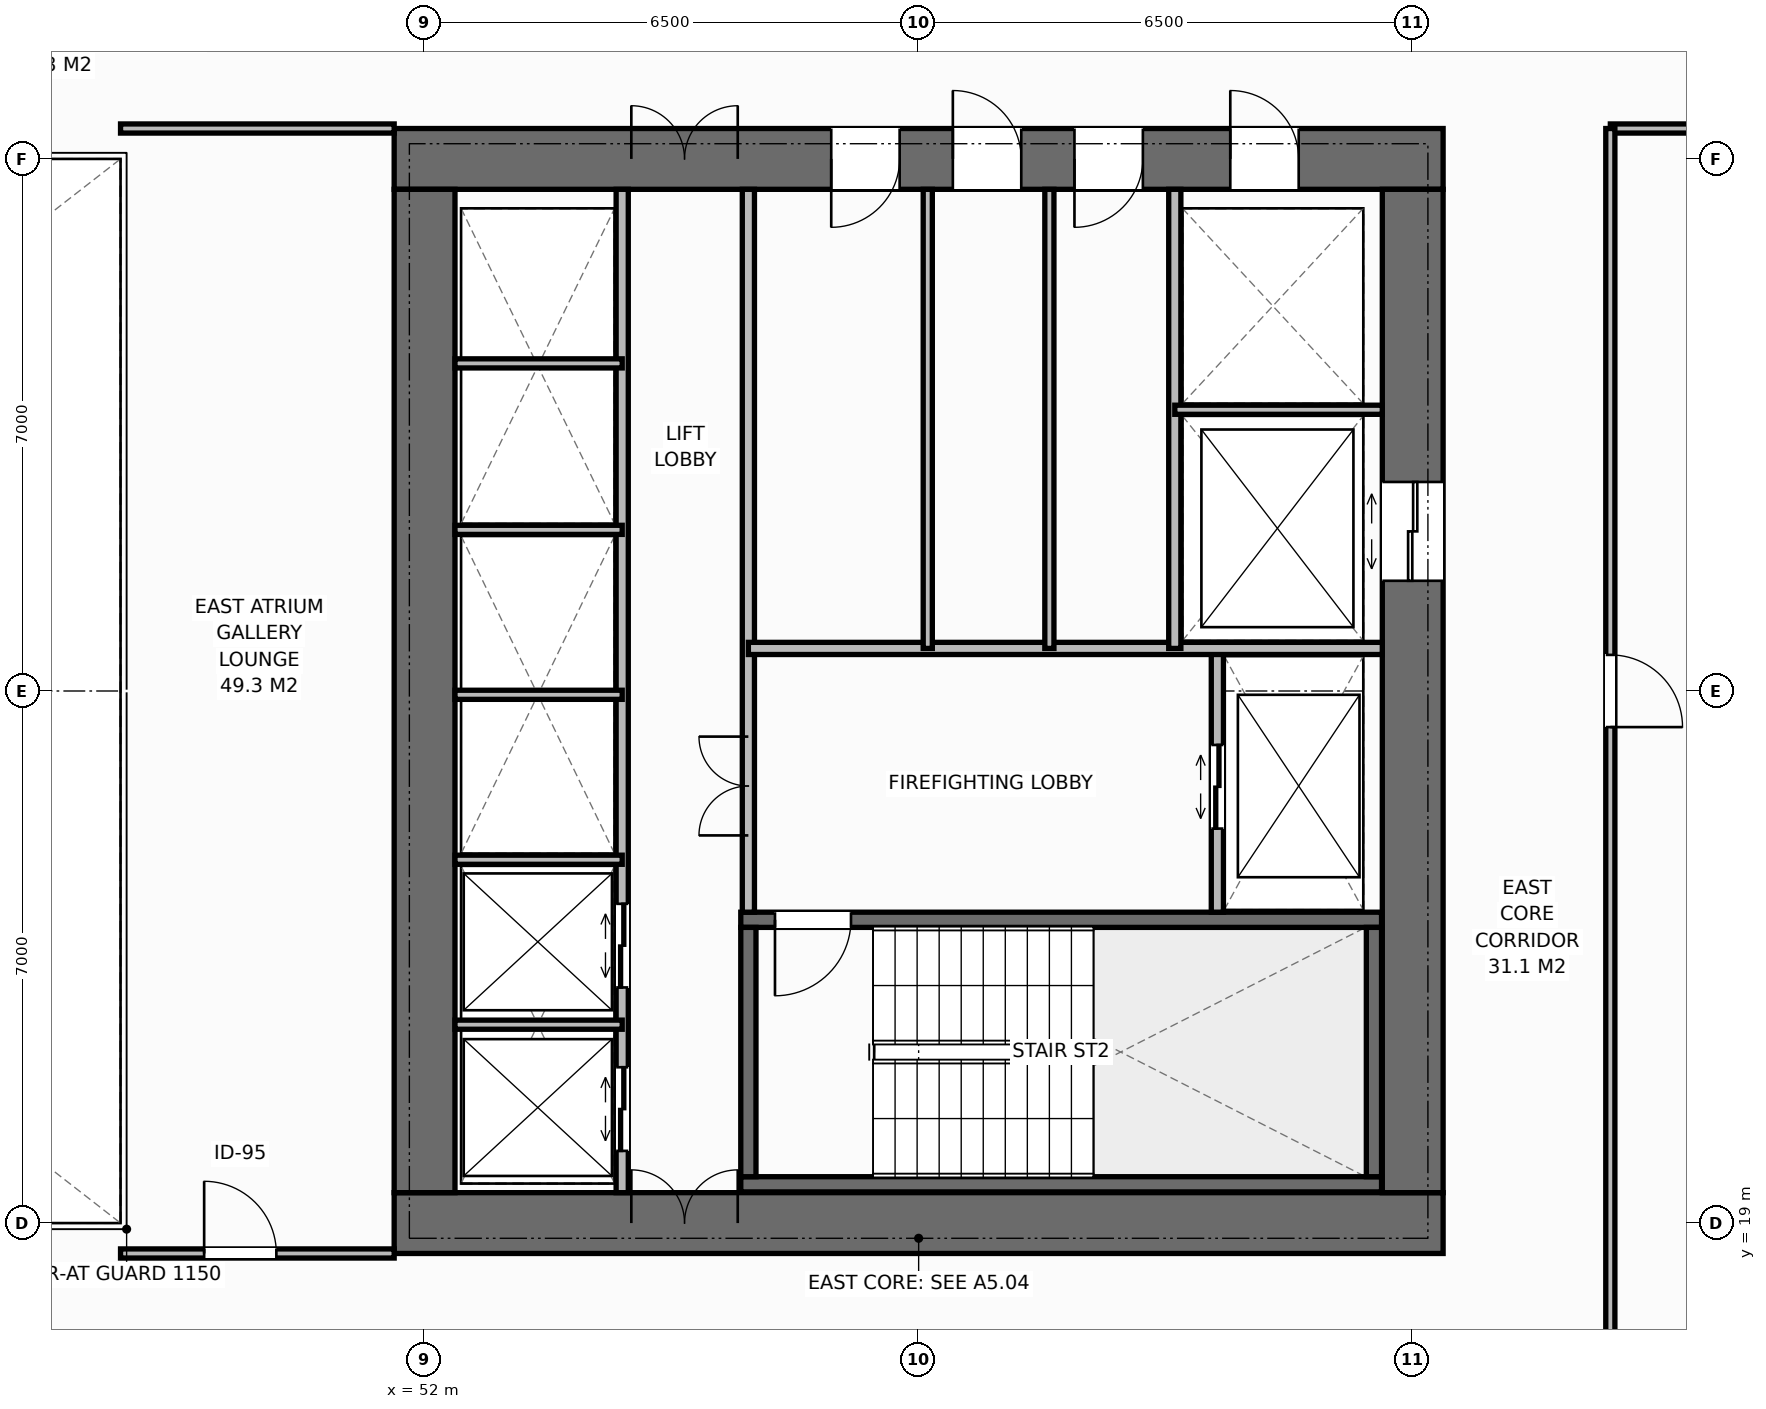
"""IFC4 building model, lengths in metres.
Left out: names, types, materials, properties, quantities, classifications, styles, units other than length and angle.
Written with IfcOpenShell. Run it as: python <this file> out.ifc"""

import sys

from ifc_helpers import new_model, si_unit, direction, frame, frame_2d, origin, place, context, subcontext, project, spatial, rectangle, extrude, element, fill, save


model = new_model("IFC4")
c1 = context("Model", 3, precision=1e-05, world=origin(), true_north=direction((0.0, 1.0)))
c2 = subcontext(c1, "Body", "Model", "MODEL_VIEW")
j1 = project(units=[si_unit("LENGTHUNIT", "METRE"), si_unit("PLANEANGLEUNIT", "RADIAN")], contexts=[c1])
p1 = place(None, origin())
s1 = spatial("IfcSite", under=j1, at=p1, CompositionType="ELEMENT")
p2 = place(p1, origin())
s2 = spatial("IfcBuilding", under=s1, at=p2, CompositionType="ELEMENT")
p3 = place(p2, frame((0.0, 0.0, 73.4)))
s3 = spatial("IfcBuildingStorey", under=s2, at=p3, CompositionType="ELEMENT", Elevation=73.4)
p4 = place(p3, frame((51.6, 19.0, 0.0), z_axis=(0.0, 0.0, 1.0), x_axis=(1.0, 0.0, 0.0)))
e1 = element("IfcWall", 1, at=p4, inside=s3, PredefinedType="SHEAR", context=c2, shape_type="SweptSolid", body=[
    extrude(rectangle(XDim=13.8, YDim=0.8, at=frame_2d((6.9, 0.0))), origin(), (0.0, 0.0, 1.0), 3.8),
])
p5 = place(p4, frame((3.12, 0.0, 0.0)))
e2 = element("IfcOpeningElement", 2, at=p5, cuts=e1, PredefinedType="OPENING", context=c2, shape_type="SweptSolid", body=[
    extrude(rectangle(XDim=1.4, YDim=2.2, at=frame_2d((0.7, 1.1))), frame((0.0, 0.41, 0.0), z_axis=(0.0, -1.0, 0.0), x_axis=(1.0, 0.0, 0.0)), (0.0, 0.0, 1.0), 0.82),
])
p6 = place(p3, frame((51.6, 33.0, 0.0), z_axis=(0.0, 0.0, 1.0), x_axis=(1.0, 0.0, 0.0)))
e3 = element("IfcWall", 3, at=p6, inside=s3, PredefinedType="SHEAR", context=c2, shape_type="SweptSolid", body=[
    extrude(rectangle(XDim=13.8, YDim=0.8, at=frame_2d((6.9, 0.0))), origin(), (0.0, 0.0, 1.0), 3.8),
])
p7 = place(p6, frame((3.12, 0.0, 0.0)))
e4 = element("IfcOpeningElement", 4, at=p7, cuts=e3, PredefinedType="OPENING", context=c2, shape_type="SweptSolid", body=[
    extrude(rectangle(XDim=1.4, YDim=2.2, at=frame_2d((0.7, 1.1))), frame((0.0, 0.41, 0.0), z_axis=(0.0, -1.0, 0.0), x_axis=(1.0, 0.0, 0.0)), (0.0, 0.0, 1.0), 0.82),
])
p8 = place(p6, frame((11.0, 0.0, 0.0)))
e5 = element("IfcOpeningElement", 5, at=p8, cuts=e3, PredefinedType="OPENING", context=c2, shape_type="SweptSolid", body=[
    extrude(rectangle(XDim=0.9, YDim=2.15, at=frame_2d((0.45, 1.075))), frame((0.0, 0.41, 0.0), z_axis=(0.0, -1.0, 0.0), x_axis=(1.0, 0.0, 0.0)), (0.0, 0.0, 1.0), 0.82),
])
p9 = place(p6, frame((5.75, 0.0, 0.0)))
e6 = element("IfcOpeningElement", 6, at=p9, cuts=e3, PredefinedType="OPENING", context=c2, shape_type="SweptSolid", body=[
    extrude(rectangle(XDim=0.9, YDim=2.15, at=frame_2d((0.45, 1.075))), frame((0.0, 0.41, 0.0), z_axis=(0.0, -1.0, 0.0), x_axis=(1.0, 0.0, 0.0)), (0.0, 0.0, 1.0), 0.82),
])
p10 = place(p6, frame((7.35, 0.0, 0.0)))
e7 = element("IfcOpeningElement", 7, at=p10, cuts=e3, PredefinedType="OPENING", context=c2, shape_type="SweptSolid", body=[
    extrude(rectangle(XDim=0.9, YDim=2.15, at=frame_2d((0.45, 1.075))), frame((0.0, 0.41, 0.0), z_axis=(0.0, -1.0, 0.0), x_axis=(1.0, 0.0, 0.0)), (0.0, 0.0, 1.0), 0.82),
])
p11 = place(p6, frame((8.95, 0.0, 0.0)))
e8 = element("IfcOpeningElement", 8, at=p11, cuts=e3, PredefinedType="OPENING", context=c2, shape_type="SweptSolid", body=[
    extrude(rectangle(XDim=0.9, YDim=2.15, at=frame_2d((0.45, 1.075))), frame((0.0, 0.41, 0.0), z_axis=(0.0, -1.0, 0.0), x_axis=(1.0, 0.0, 0.0)), (0.0, 0.0, 1.0), 0.82),
])
p12 = place(p3, frame((52.0, 19.4, 0.0), z_axis=(0.0, 0.0, 1.0), x_axis=(0.0, 1.0, 0.0)))
e9 = element("IfcWall", 9, at=p12, inside=s3, PredefinedType="SHEAR", context=c2, shape_type="SweptSolid", body=[
    extrude(rectangle(XDim=13.2, YDim=0.8, at=frame_2d((6.6, 0.0))), origin(), (0.0, 0.0, 1.0), 3.8),
])
p13 = place(p3, frame((65.0, 19.4, 0.0), z_axis=(0.0, 0.0, 1.0), x_axis=(0.0, 1.0, 0.0)))
e10 = element("IfcWall", 10, at=p13, inside=s3, PredefinedType="SHEAR", context=c2, shape_type="SweptSolid", body=[
    extrude(rectangle(XDim=13.2, YDim=0.8, at=frame_2d((6.6, 0.0))), origin(), (0.0, 0.0, 1.0), 3.8),
])
p14 = place(p13, frame((8.05, 0.0, 0.0)))
e11 = element("IfcOpeningElement", 11, at=p14, cuts=e10, PredefinedType="OPENING", context=c2, shape_type="SweptSolid", body=[
    extrude(rectangle(XDim=1.3, YDim=2.2, at=frame_2d((0.65, 1.1))), frame((0.0, 0.41, 0.0), z_axis=(0.0, -1.0, 0.0), x_axis=(1.0, 0.0, 0.0)), (0.0, 0.0, 1.0), 0.82),
])
p15 = place(p3, frame((56.16, 19.51, 0.0), z_axis=(0.0, 0.0, 1.0), x_axis=(1.0, 0.0, 0.0)))
e12 = element("IfcWall", 12, at=p15, inside=s3, PredefinedType="SHEAR", context=c2, shape_type="SweptSolid", body=[
    extrude(rectangle(XDim=8.43, YDim=0.2, at=frame_2d((4.215, 0.0))), origin(), (0.0, 0.0, 1.0), 3.8),
])
p16 = place(p3, frame((56.16, 22.99, 0.0), z_axis=(0.0, 0.0, 1.0), x_axis=(1.0, 0.0, 0.0)))
e13 = element("IfcWall", 13, at=p16, inside=s3, PredefinedType="SHEAR", context=c2, shape_type="SweptSolid", body=[
    extrude(rectangle(XDim=8.43, YDim=0.2, at=frame_2d((4.215, 0.0))), origin(), (0.0, 0.0, 1.0), 3.8),
])
p17 = place(p16, frame((0.45, 0.0, 0.0)))
e14 = element("IfcOpeningElement", 14, at=p17, cuts=e13, PredefinedType="OPENING", context=c2, shape_type="SweptSolid", body=[
    extrude(rectangle(XDim=1.0, YDim=2.15, at=frame_2d((0.5, 1.075))), frame((0.0, 0.11, 0.0), z_axis=(0.0, -1.0, 0.0), x_axis=(1.0, 0.0, 0.0)), (0.0, 0.0, 1.0), 0.22),
])
for number, where, z_axis, x_axis in (
    (15, (56.26, 19.61, 0.0), (0.0, 0.0, 1.0), (0.0, 1.0, 0.0)),
    (16, (64.49, 19.61, 0.0), (0.0, 0.0, 1.0), (0.0, 1.0, 0.0)),
):
    element("IfcWall", number, at=place(p3, frame(where, z_axis=z_axis, x_axis=x_axis)), inside=s3, PredefinedType="SHEAR", context=c2, shape_type="SweptSolid", body=[
        extrude(rectangle(XDim=3.28, YDim=0.2, at=frame_2d((1.64, 0.0))), origin(), (0.0, 0.0, 1.0), 3.8),
    ])
p18 = place(p3, frame((54.6, 19.4, 0.0), z_axis=(0.0, 0.0, 1.0), x_axis=(0.0, 1.0, 0.0)))
e17 = element("IfcWall", 17, at=p18, inside=s3, PredefinedType="STANDARD", context=c2, shape_type="SweptSolid", body=[
    extrude(rectangle(XDim=13.2, YDim=0.16, at=frame_2d((6.6, 0.0))), origin(), (0.0, 0.0, 1.0), 3.55),
])
p19 = place(p18, frame((0.55, 0.0, 0.0)))
e18 = element("IfcOpeningElement", 18, at=p19, cuts=e17, PredefinedType="OPENING", context=c2, shape_type="SweptSolid", body=[
    extrude(rectangle(XDim=1.1, YDim=2.2, at=frame_2d((0.55, 1.1))), frame((0.0, 0.09, 0.0), z_axis=(0.0, -1.0, 0.0), x_axis=(1.0, 0.0, 0.0)), (0.0, 0.0, 1.0), 0.18),
])
p20 = place(p18, frame((2.7, 0.0, 0.0)))
e19 = element("IfcOpeningElement", 19, at=p20, cuts=e17, PredefinedType="OPENING", context=c2, shape_type="SweptSolid", body=[
    extrude(rectangle(XDim=1.1, YDim=2.2, at=frame_2d((0.55, 1.1))), frame((0.0, 0.09, 0.0), z_axis=(0.0, -1.0, 0.0), x_axis=(1.0, 0.0, 0.0)), (0.0, 0.0, 1.0), 0.18),
])
p21 = place(p3, frame((56.26, 23.09, 0.0), z_axis=(0.0, 0.0, 1.0), x_axis=(0.0, 1.0, 0.0)))
e20 = element("IfcWall", 20, at=p21, inside=s3, PredefinedType="STANDARD", context=c2, shape_type="SweptSolid", body=[
    extrude(rectangle(XDim=9.51, YDim=0.16, at=frame_2d((4.755, 0.0))), origin(), (0.0, 0.0, 1.0), 3.55),
])
p22 = place(p21, frame((1.01, 0.0, 0.0)))
e21 = element("IfcOpeningElement", 21, at=p22, cuts=e20, PredefinedType="OPENING", context=c2, shape_type="SweptSolid", body=[
    extrude(rectangle(XDim=1.3, YDim=2.2, at=frame_2d((0.65, 1.1))), frame((0.0, 0.09, 0.0), z_axis=(0.0, -1.0, 0.0), x_axis=(1.0, 0.0, 0.0)), (0.0, 0.0, 1.0), 0.18),
])
for number, where, z_axis, x_axis in (
    (22, (52.4, 21.61, 0.0), (0.0, 0.0, 1.0), (1.0, 0.0, 0.0)),
    (23, (52.4, 23.78, 0.0), (0.0, 0.0, 1.0), (1.0, 0.0, 0.0)),
    (24, (52.4, 25.95, 0.0), (0.0, 0.0, 1.0), (1.0, 0.0, 0.0)),
    (25, (52.4, 28.12, 0.0), (0.0, 0.0, 1.0), (1.0, 0.0, 0.0)),
    (26, (52.4, 30.31, 0.0), (0.0, 0.0, 1.0), (1.0, 0.0, 0.0)),
):
    element("IfcWall", number, at=place(p3, frame(where, z_axis=z_axis, x_axis=x_axis)), inside=s3, PredefinedType="PARTITIONING", context=c2, shape_type="SweptSolid", body=[
        extrude(rectangle(XDim=2.2, YDim=0.12, at=frame_2d((1.1, 0.0))), origin(), (0.0, 0.0, 1.0), 3.55),
    ])
p23 = place(p3, frame((62.43, 23.09, 0.0), z_axis=(0.0, 0.0, 1.0), x_axis=(0.0, 1.0, 0.0)))
e27 = element("IfcWall", 27, at=p23, inside=s3, PredefinedType="STANDARD", context=c2, shape_type="SweptSolid", body=[
    extrude(rectangle(XDim=3.47, YDim=0.16, at=frame_2d((1.735, 0.0))), origin(), (0.0, 0.0, 1.0), 3.55),
])
p24 = place(p23, frame((1.1, 0.0, 0.0)))
e28 = element("IfcOpeningElement", 28, at=p24, cuts=e27, PredefinedType="OPENING", context=c2, shape_type="SweptSolid", body=[
    extrude(rectangle(XDim=1.1, YDim=2.2, at=frame_2d((0.55, 1.1))), frame((0.0, 0.09, 0.0), z_axis=(0.0, -1.0, 0.0), x_axis=(1.0, 0.0, 0.0)), (0.0, 0.0, 1.0), 0.18),
])
p25 = place(p3, frame((56.26, 26.56, 0.0), z_axis=(0.0, 0.0, 1.0), x_axis=(1.0, 0.0, 0.0)))
e29 = element("IfcWall", 29, at=p25, inside=s3, PredefinedType="STANDARD", context=c2, shape_type="SweptSolid", body=[
    extrude(rectangle(XDim=8.34, YDim=0.16, at=frame_2d((4.17, 0.0))), origin(), (0.0, 0.0, 1.0), 3.55),
])
p26 = place(p3, frame((61.87, 26.56, 0.0), z_axis=(0.0, 0.0, 1.0), x_axis=(0.0, 1.0, 0.0)))
e30 = element("IfcWall", 30, at=p26, inside=s3, PredefinedType="STANDARD", context=c2, shape_type="SweptSolid", body=[
    extrude(rectangle(XDim=6.04, YDim=0.16, at=frame_2d((3.02, 0.0))), origin(), (0.0, 0.0, 1.0), 3.55),
])
p27 = place(p3, frame((61.87, 29.7, 0.0), z_axis=(0.0, 0.0, 1.0), x_axis=(1.0, 0.0, 0.0)))
e31 = element("IfcWall", 31, at=p27, inside=s3, PredefinedType="PARTITIONING", context=c2, shape_type="SweptSolid", body=[
    extrude(rectangle(XDim=2.73, YDim=0.12, at=frame_2d((1.365, 0.0))), origin(), (0.0, 0.0, 1.0), 3.55),
])
for number, where, z_axis, x_axis in (
    (32, (58.62, 26.56, 0.0), (0.0, 0.0, 1.0), (0.0, 1.0, 0.0)),
    (33, (60.22, 26.56, 0.0), (0.0, 0.0, 1.0), (0.0, 1.0, 0.0)),
):
    element("IfcWall", number, at=place(p3, frame(where, z_axis=z_axis, x_axis=x_axis)), inside=s3, PredefinedType="PARTITIONING", context=c2, shape_type="SweptSolid", body=[
        extrude(rectangle(XDim=6.04, YDim=0.12, at=frame_2d((3.02, 0.0))), origin(), (0.0, 0.0, 1.0), 3.55),
    ])
p28 = place(p3, frame((48.0, 33.4, 0.0), z_axis=(0.0, 0.0, 1.0), x_axis=(1.0, 0.0, 0.0)))
e34 = element("IfcWall", 34, at=p28, inside=s3, PredefinedType="PARTITIONING", context=c2, shape_type="SweptSolid", body=[
    extrude(rectangle(XDim=3.6, YDim=0.12, at=frame_2d((1.8, 0.0))), origin(), (0.0, 0.0, 1.0), 3.55),
])
p29 = place(p3, frame((48.0, 18.6, 0.0), z_axis=(0.0, 0.0, 1.0), x_axis=(1.0, 0.0, 0.0)))
e35 = element("IfcWall", 35, at=p29, inside=s3, PredefinedType="PARTITIONING", context=c2, shape_type="SweptSolid", body=[
    extrude(rectangle(XDim=3.6, YDim=0.12, at=frame_2d((1.8, 0.0))), origin(), (0.0, 0.0, 1.0), 3.55),
])
p30 = place(p29, frame((1.1, 0.0, 0.0)))
e36 = element("IfcOpeningElement", 36, at=p30, cuts=e35, PredefinedType="OPENING", context=c2, shape_type="SweptSolid", body=[
    extrude(rectangle(XDim=0.95, YDim=2.15, at=frame_2d((0.475, 1.075))), frame((0.0, 0.07, 0.0), z_axis=(0.0, -1.0, 0.0), x_axis=(1.0, 0.0, 0.0)), (0.0, 0.0, 1.0), 0.14),
])
p31 = place(p3, frame((67.6, 33.4, 0.0), z_axis=(0.0, 0.0, 1.0), x_axis=(1.0, 0.0, 0.0)))
e37 = element("IfcWall", 37, at=p31, inside=s3, PredefinedType="PARTITIONING", context=c2, shape_type="SweptSolid", body=[
    extrude(rectangle(XDim=10.58, YDim=0.12, at=frame_2d((5.29, 0.0))), origin(), (0.0, 0.0, 1.0), 3.55),
])
p32 = place(p3, frame((67.6, 16.5, 0.0), z_axis=(0.0, 0.0, 1.0), x_axis=(0.0, 1.0, 0.0)))
e38 = element("IfcWall", 38, at=p32, inside=s3, PredefinedType="PARTITIONING", context=c2, shape_type="SweptSolid", body=[
    extrude(rectangle(XDim=16.9, YDim=0.12, at=frame_2d((8.45, 0.0))), origin(), (0.0, 0.0, 1.0), 3.55),
])
p33 = place(p32, frame((9.025, 0.0, 0.0)))
e39 = element("IfcOpeningElement", 39, at=p33, cuts=e38, PredefinedType="OPENING", context=c2, shape_type="SweptSolid", body=[
    extrude(rectangle(XDim=0.95, YDim=2.15, at=frame_2d((0.475, 1.075))), frame((0.0, 0.07, 0.0), z_axis=(0.0, -1.0, 0.0), x_axis=(1.0, 0.0, 0.0)), (0.0, 0.0, 1.0), 0.14),
])
p34 = place(p5, origin())
e40 = element("IfcDoor", 40, at=p34, inside=s3, OperationType="DOUBLE_DOOR_SINGLE_SWING", PredefinedType="DOOR", context=c2, shape_type="SweptSolid", body=[
    extrude(rectangle(XDim=1.4, YDim=2.2, at=frame_2d((0.7, 1.1))), frame((0.0, 0.125, 0.0), z_axis=(0.0, -1.0, 0.0), x_axis=(1.0, 0.0, 0.0)), (0.0, 0.0, 1.0), 0.05),
])
fill(e2, e40)
p35 = place(p7, origin())
e41 = element("IfcDoor", 41, at=p35, inside=s3, OperationType="DOUBLE_DOOR_SINGLE_SWING", PredefinedType="DOOR", context=c2, shape_type="SweptSolid", body=[
    extrude(rectangle(XDim=1.4, YDim=2.2, at=frame_2d((0.7, 1.1))), frame((0.0, -0.075, 0.0), z_axis=(0.0, -1.0, 0.0), x_axis=(1.0, 0.0, 0.0)), (0.0, 0.0, 1.0), 0.05),
])
fill(e4, e41)
p36 = place(p19, origin())
e42 = element("IfcDoor", 42, at=p36, inside=s3, OperationType="DOUBLE_DOOR_SLIDING", PredefinedType="DOOR", context=c2, shape_type="SweptSolid", body=[
    extrude(rectangle(XDim=1.1, YDim=2.2, at=frame_2d((0.55, 1.1))), frame((0.0, 0.025, 0.0), z_axis=(0.0, -1.0, 0.0), x_axis=(1.0, 0.0, 0.0)), (0.0, 0.0, 1.0), 0.05),
])
fill(e18, e42)
p37 = place(p20, origin())
e43 = element("IfcDoor", 43, at=p37, inside=s3, OperationType="DOUBLE_DOOR_SLIDING", PredefinedType="DOOR", context=c2, shape_type="SweptSolid", body=[
    extrude(rectangle(XDim=1.1, YDim=2.2, at=frame_2d((0.55, 1.1))), frame((0.0, 0.025, 0.0), z_axis=(0.0, -1.0, 0.0), x_axis=(1.0, 0.0, 0.0)), (0.0, 0.0, 1.0), 0.05),
])
fill(e19, e43)
p38 = place(p17, origin())
e44 = element("IfcDoor", 44, at=p38, inside=s3, OperationType="SINGLE_SWING_RIGHT", PredefinedType="DOOR", context=c2, shape_type="SweptSolid", body=[
    extrude(rectangle(XDim=1.0, YDim=2.15, at=frame_2d((0.5, 1.075))), frame((0.0, 0.025, 0.0), z_axis=(0.0, -1.0, 0.0), x_axis=(1.0, 0.0, 0.0)), (0.0, 0.0, 1.0), 0.05),
])
fill(e14, e44)
p39 = place(p24, origin())
e45 = element("IfcDoor", 45, at=p39, inside=s3, OperationType="DOUBLE_DOOR_SLIDING", PredefinedType="DOOR", context=c2, shape_type="SweptSolid", body=[
    extrude(rectangle(XDim=1.1, YDim=2.2, at=frame_2d((0.55, 1.1))), frame((0.0, 0.025, 0.0), z_axis=(0.0, -1.0, 0.0), x_axis=(1.0, 0.0, 0.0)), (0.0, 0.0, 1.0), 0.05),
])
fill(e28, e45)
p40 = place(p22, origin())
e46 = element("IfcDoor", 46, at=p40, inside=s3, OperationType="DOUBLE_DOOR_SINGLE_SWING", PredefinedType="DOOR", context=c2, shape_type="SweptSolid", body=[
    extrude(rectangle(XDim=1.3, YDim=2.2, at=frame_2d((0.65, 1.1))), frame((0.0, 0.025, 0.0), z_axis=(0.0, -1.0, 0.0), x_axis=(1.0, 0.0, 0.0)), (0.0, 0.0, 1.0), 0.05),
])
fill(e21, e46)
p41 = place(p14, origin())
e47 = element("IfcDoor", 47, at=p41, inside=s3, OperationType="DOUBLE_DOOR_SLIDING", PredefinedType="DOOR", context=c2, shape_type="SweptSolid", body=[
    extrude(rectangle(XDim=1.3, YDim=2.2, at=frame_2d((0.65, 1.1))), frame((0.0, 0.025, 0.0), z_axis=(0.0, -1.0, 0.0), x_axis=(1.0, 0.0, 0.0)), (0.0, 0.0, 1.0), 0.05),
])
fill(e11, e47)
p42 = place(p8, origin())
e48 = element("IfcDoor", 48, at=p42, inside=s3, OperationType="SINGLE_SWING_LEFT", PredefinedType="DOOR", context=c2, shape_type="SweptSolid", body=[
    extrude(rectangle(XDim=0.9, YDim=2.15, at=frame_2d((0.45, 1.075))), frame((0.0, -0.075, 0.0), z_axis=(0.0, -1.0, 0.0), x_axis=(1.0, 0.0, 0.0)), (0.0, 0.0, 1.0), 0.05),
])
fill(e5, e48)
p43 = place(p9, origin())
e49 = element("IfcDoor", 49, at=p43, inside=s3, OperationType="SINGLE_SWING_RIGHT", PredefinedType="DOOR", context=c2, shape_type="SweptSolid", body=[
    extrude(rectangle(XDim=0.9, YDim=2.15, at=frame_2d((0.45, 1.075))), frame((0.0, -0.075, 0.0), z_axis=(0.0, -1.0, 0.0), x_axis=(1.0, 0.0, 0.0)), (0.0, 0.0, 1.0), 0.05),
])
fill(e6, e49)
p44 = place(p10, origin())
e50 = element("IfcDoor", 50, at=p44, inside=s3, OperationType="SINGLE_SWING_LEFT", PredefinedType="DOOR", context=c2, shape_type="SweptSolid", body=[
    extrude(rectangle(XDim=0.9, YDim=2.15, at=frame_2d((0.45, 1.075))), frame((0.0, -0.075, 0.0), z_axis=(0.0, -1.0, 0.0), x_axis=(1.0, 0.0, 0.0)), (0.0, 0.0, 1.0), 0.05),
])
fill(e7, e50)
p45 = place(p11, origin())
e51 = element("IfcDoor", 51, at=p45, inside=s3, OperationType="SINGLE_SWING_RIGHT", PredefinedType="DOOR", context=c2, shape_type="SweptSolid", body=[
    extrude(rectangle(XDim=0.9, YDim=2.15, at=frame_2d((0.45, 1.075))), frame((0.0, -0.075, 0.0), z_axis=(0.0, -1.0, 0.0), x_axis=(1.0, 0.0, 0.0)), (0.0, 0.0, 1.0), 0.05),
])
fill(e8, e51)
p46 = place(p30, origin())
e52 = element("IfcDoor", 52, at=p46, inside=s3, OperationType="SINGLE_SWING_LEFT", PredefinedType="DOOR", context=c2, shape_type="SweptSolid", body=[
    extrude(rectangle(XDim=0.95, YDim=2.15, at=frame_2d((0.475, 1.075))), frame((0.0, 0.025, 0.0), z_axis=(0.0, -1.0, 0.0), x_axis=(1.0, 0.0, 0.0)), (0.0, 0.0, 1.0), 0.05),
])
fill(e36, e52)
p47 = place(p33, origin())
e53 = element("IfcDoor", 53, at=p47, inside=s3, OperationType="SINGLE_SWING_RIGHT", PredefinedType="DOOR", context=c2, shape_type="SweptSolid", body=[
    extrude(rectangle(XDim=0.95, YDim=2.15, at=frame_2d((0.475, 1.075))), frame((0.0, 0.025, 0.0), z_axis=(0.0, -1.0, 0.0), x_axis=(1.0, 0.0, 0.0)), (0.0, 0.0, 1.0), 0.05),
])
fill(e39, e53)
save(model, sys.argv[1])
